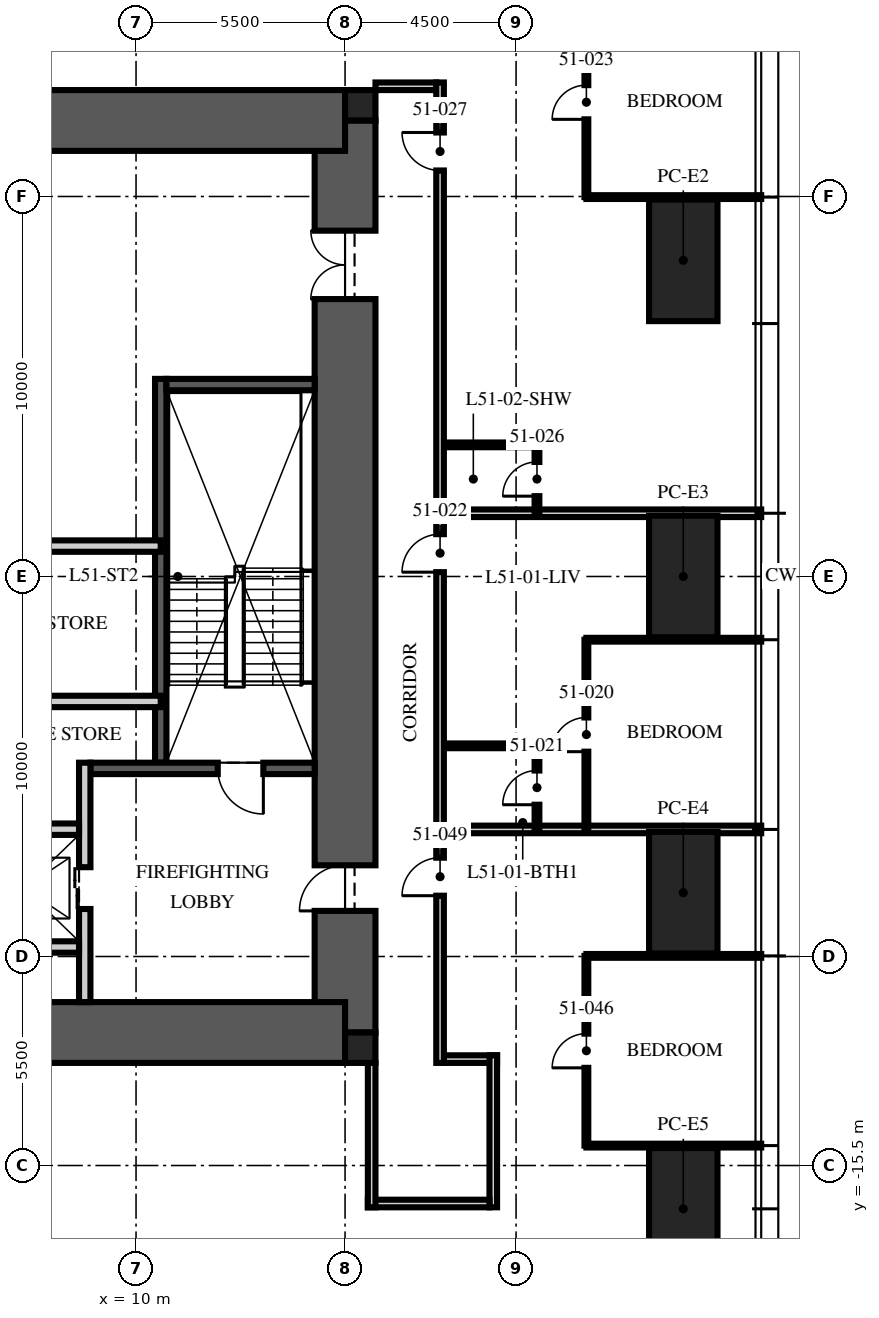
"""IFC4 building model, lengths in metres.
Left out: names, types, materials, properties, quantities, classifications, styles, units other than length and angle.
Written with IfcOpenShell. Run it as: python <this file> out.ifc"""

import sys

from ifc_helpers import new_model, si_unit, direction, frame, frame_2d, origin, origin_2d, place, context, subcontext, project, spatial, rectangle, hollow_rectangle, extrude, element, fill, save


model = new_model("IFC4")
c1 = context("Model", 3, precision=1e-05, world=origin(), true_north=direction((0.0, 1.0)))
c2 = subcontext(c1, "Body", "Model", "MODEL_VIEW")
j1 = project(units=[si_unit("LENGTHUNIT", "METRE"), si_unit("PLANEANGLEUNIT", "RADIAN")], contexts=[c1])
p1 = place(None, origin())
s1 = spatial("IfcSite", under=j1, at=p1, CompositionType="ELEMENT")
p2 = place(p1, origin())
s2 = spatial("IfcBuilding", under=s1, at=p2, CompositionType="ELEMENT")
p3 = place(p2, frame((0.0, 0.0, 207.0)))
s3 = spatial("IfcBuildingStorey", under=s2, at=p3, CompositionType="ELEMENT", Elevation=207.0)
p4 = place(p3, frame((15.5, -12.0, -0.25), z_axis=(0.0, 0.0, 1.0), x_axis=(0.0, 1.0, 0.0)))
e1 = element("IfcWall", 1, at=p4, inside=s3, PredefinedType="SHEAR", context=c2, shape_type="SweptSolid", body=[
    extrude(rectangle(XDim=24.0, YDim=1.6, at=frame_2d((12.0, 0.0))), origin(), (0.0, 0.0, 1.0), 3.75),
])
p5 = place(p4, frame((3.2, 0.0, 0.25)))
e2 = element("IfcOpeningElement", 2, at=p5, cuts=e1, PredefinedType="OPENING", context=c2, shape_type="SweptSolid", body=[
    extrude(rectangle(XDim=1.2, YDim=2.1, at=frame_2d((0.6, 1.05))), frame((0.0, 0.81, 0.0), z_axis=(0.0, -1.0, 0.0), x_axis=(1.0, 0.0, 0.0)), (0.0, 0.0, 1.0), 1.62),
])
p6 = place(p4, frame((19.3, 0.0, 0.25)))
e3 = element("IfcOpeningElement", 3, at=p6, cuts=e1, PredefinedType="OPENING", context=c2, shape_type="SweptSolid", body=[
    extrude(rectangle(XDim=1.8, YDim=2.1, at=frame_2d((0.9, 1.05))), frame((0.0, 0.81, 0.0), z_axis=(0.0, -1.0, 0.0), x_axis=(1.0, 0.0, 0.0)), (0.0, 0.0, 1.0), 1.62),
])
for number, where, z_axis, x_axis in (
    (4, (-15.5, 12.0, -0.25), (0.0, 0.0, 1.0), (1.0, 0.0, 0.0)),
    (5, (-15.5, -12.0, -0.25), (0.0, 0.0, 1.0), (1.0, 0.0, 0.0)),
):
    element("IfcWall", number, at=place(p3, frame(where, z_axis=z_axis, x_axis=x_axis)), inside=s3, PredefinedType="SHEAR", context=c2, shape_type="SweptSolid", body=[
        extrude(rectangle(XDim=31.0, YDim=1.6, at=frame_2d((15.5, 0.0))), origin(), (0.0, 0.0, 1.0), 3.75),
    ])
for number, where, z_axis, x_axis in (
    (6, (15.9, 12.4, -0.25), (0.0, 0.0, 1.0), (1.0, 0.0, 0.0)),
    (7, (15.9, -12.4, -0.25), (0.0, 0.0, 1.0), (1.0, 0.0, 0.0)),
):
    element("IfcColumn", number, at=place(p3, frame(where, z_axis=z_axis, x_axis=x_axis)), inside=s3, PredefinedType="COLUMN", context=c2, shape_type="SweptSolid", body=[
        extrude(rectangle(XDim=0.8, YDim=0.8, at=origin_2d()), origin(), (0.0, 0.0, 1.0), 3.75),
    ])
for number, where, z_axis, x_axis in (
    (8, (24.4, 8.32, 0.0), (0.0, 0.0, 1.0), (0.0, 1.0, 0.0)),
    (9, (24.4, 0.0, 0.0), (0.0, 0.0, 1.0), (0.0, 1.0, 0.0)),
    (10, (24.4, -8.32, 0.0), (0.0, 0.0, 1.0), (0.0, 1.0, 0.0)),
    (11, (24.4, -16.64, 0.0), (0.0, 0.0, 1.0), (0.0, 1.0, 0.0)),
):
    element("IfcColumn", number, at=place(p3, frame(where, z_axis=z_axis, x_axis=x_axis)), inside=s3, PredefinedType="COLUMN", context=c2, shape_type="SweptSolid", body=[
        extrude(hollow_rectangle(XDim=3.2, YDim=1.8, WallThickness=0.2, at=origin_2d()), origin(), (0.0, 0.0, 1.0), 3.75),
    ])
p7 = place(p3, frame((10.65, -4.9, 0.0), z_axis=(0.0, 0.0, 1.0), x_axis=(0.0, 1.0, 0.0)))
e12 = element("IfcWall", 12, at=p7, inside=s3, PredefinedType="SOLIDWALL", context=c2, shape_type="SweptSolid", body=[
    extrude(rectangle(XDim=10.1, YDim=0.3, at=frame_2d((5.05, 0.0))), origin(), (0.0, 0.0, 1.0), 3.5),
])
p8 = place(p3, frame((14.7, -5.05, 0.0), z_axis=(0.0, 0.0, 1.0), x_axis=(-1.0, 0.0, 0.0)))
e13 = element("IfcWall", 13, at=p8, inside=s3, PredefinedType="SOLIDWALL", context=c2, shape_type="SweptSolid", body=[
    extrude(rectangle(XDim=5.9, YDim=0.3, at=frame_2d((2.95, 0.0))), origin(), (0.0, 0.0, 1.0), 3.5),
])
p9 = place(p8, frame((1.35, 0.0, 0.0)))
e14 = element("IfcOpeningElement", 14, at=p9, cuts=e13, PredefinedType="OPENING", context=c2, shape_type="SweptSolid", body=[
    extrude(rectangle(XDim=1.2, YDim=2.1, at=frame_2d((0.6, 1.05))), frame((0.0, 0.16, 0.0), z_axis=(0.0, -1.0, 0.0), x_axis=(1.0, 0.0, 0.0)), (0.0, 0.0, 1.0), 0.32),
])
p10 = place(p3, frame((14.7, 5.05, 0.0), z_axis=(0.0, 0.0, 1.0), x_axis=(-1.0, 0.0, 0.0)))
e15 = element("IfcWall", 15, at=p10, inside=s3, PredefinedType="SOLIDWALL", context=c2, shape_type="SweptSolid", body=[
    extrude(rectangle(XDim=3.9, YDim=0.3, at=frame_2d((1.95, 0.0))), origin(), (0.0, 0.0, 1.0), 3.5),
])
p11 = place(p3, frame((8.65, -11.2, 0.0), z_axis=(0.0, 0.0, 1.0), x_axis=(0.0, 1.0, 0.0)))
e16 = element("IfcWall", 16, at=p11, inside=s3, PredefinedType="PARTITIONING", context=c2, shape_type="SweptSolid", body=[
    extrude(rectangle(XDim=6.3, YDim=0.3, at=frame_2d((3.15, 0.0))), origin(), (0.0, 0.0, 1.0), 3.5),
])
p12 = place(p11, frame((2.45, 0.0, 0.0)))
e17 = element("IfcOpeningElement", 17, at=p12, cuts=e16, PredefinedType="OPENING", context=c2, shape_type="SweptSolid", body=[
    extrude(rectangle(XDim=1.1, YDim=2.1, at=frame_2d((0.55, 1.05))), frame((0.0, 0.16, 0.0), z_axis=(0.0, -1.0, 0.0), x_axis=(1.0, 0.0, 0.0)), (0.0, 0.0, 1.0), 0.32),
])
p13 = place(p3, frame((-8.5, -6.65, 0.0), z_axis=(0.0, 0.0, 1.0), x_axis=(1.0, 0.0, 0.0)))
e18 = element("IfcWall", 18, at=p13, inside=s3, PredefinedType="PARTITIONING", context=c2, shape_type="SweptSolid", body=[
    extrude(rectangle(XDim=17.0, YDim=0.3, at=frame_2d((8.5, 0.0))), origin(), (0.0, 0.0, 1.0), 3.5),
])
p14 = place(p13, frame((7.8, 0.0, 0.0)))
e19 = element("IfcOpeningElement", 19, at=p14, cuts=e18, PredefinedType="OPENING", context=c2, shape_type="SweptSolid", body=[
    extrude(rectangle(XDim=1.3, YDim=2.4, at=frame_2d((0.65, 1.2))), frame((0.0, 0.16, 0.0), z_axis=(0.0, -1.0, 0.0), x_axis=(1.0, 0.0, 0.0)), (0.0, 0.0, 1.0), 0.32),
])
p15 = place(p13, frame((5.65, 0.0, 0.0)))
e20 = element("IfcOpeningElement", 20, at=p15, cuts=e18, PredefinedType="OPENING", context=c2, shape_type="SweptSolid", body=[
    extrude(rectangle(XDim=0.9, YDim=2.1, at=frame_2d((0.45, 1.05))), frame((0.0, 0.16, 0.0), z_axis=(0.0, -1.0, 0.0), x_axis=(1.0, 0.0, 0.0)), (0.0, 0.0, 1.0), 0.32),
])
p16 = place(p13, frame((10.4, 0.0, 0.0)))
e21 = element("IfcOpeningElement", 21, at=p16, cuts=e18, PredefinedType="OPENING", context=c2, shape_type="SweptSolid", body=[
    extrude(rectangle(XDim=0.9, YDim=2.1, at=frame_2d((0.45, 1.05))), frame((0.0, 0.16, 0.0), z_axis=(0.0, -1.0, 0.0), x_axis=(1.0, 0.0, 0.0)), (0.0, 0.0, 1.0), 0.32),
])
p17 = place(p3, frame((5.6, -9.75, 0.0), z_axis=(0.0, 0.0, 1.0), x_axis=(1.0, 0.0, 0.0)))
e22 = element("IfcWall", 22, at=p17, inside=s3, PredefinedType="PARTITIONING", context=c2, shape_type="SweptSolid", body=[
    extrude(rectangle(XDim=2.9, YDim=0.3, at=frame_2d((1.45, 0.0))), origin(), (0.0, 0.0, 1.0), 3.5),
])
p18 = place(p3, frame((-10.65, 0.8, 0.0), z_axis=(0.0, 0.0, 1.0), x_axis=(1.0, 0.0, 0.0)))
e23 = element("IfcWall", 23, at=p18, inside=s3, PredefinedType="PARTITIONING", context=c2, shape_type="SweptSolid", body=[
    extrude(rectangle(XDim=21.3, YDim=0.3, at=frame_2d((10.65, 0.0))), origin(), (0.0, 0.0, 1.0), 3.5),
])
p19 = place(p18, frame((10.05, 0.0, 0.0)))
e24 = element("IfcOpeningElement", 24, at=p19, cuts=e23, PredefinedType="OPENING", context=c2, shape_type="SweptSolid", body=[
    extrude(rectangle(XDim=1.2, YDim=2.1, at=frame_2d((0.6, 1.05))), frame((0.0, 0.16, 0.0), z_axis=(0.0, -1.0, 0.0), x_axis=(1.0, 0.0, 0.0)), (0.0, 0.0, 1.0), 0.32),
])
p20 = place(p18, frame((1.74, 0.0, 0.0)))
e25 = element("IfcOpeningElement", 25, at=p20, cuts=e23, PredefinedType="OPENING", context=c2, shape_type="SweptSolid", body=[
    extrude(rectangle(XDim=0.9, YDim=2.1, at=frame_2d((0.45, 1.05))), frame((0.0, 0.16, 0.0), z_axis=(0.0, -1.0, 0.0), x_axis=(1.0, 0.0, 0.0)), (0.0, 0.0, 1.0), 0.32),
])
p21 = place(p3, frame((10.65, -3.288, 0.0), z_axis=(0.0, 0.0, 1.0), x_axis=(-1.0, 0.0, 0.0)))
e26 = element("IfcWall", 26, at=p21, inside=s3, PredefinedType="PARTITIONING", context=c2, shape_type="SweptSolid", body=[
    extrude(rectangle(XDim=7.35, YDim=0.3, at=frame_2d((3.675, 0.0))), origin(), (0.0, 0.0, 1.0), 3.5),
])
p22 = place(p3, frame((18.1, -12.7, 0.0), z_axis=(0.0, 0.0, 1.0), x_axis=(1.0, 0.0, 0.0)))
e27 = element("IfcWall", 27, at=p22, inside=s3, PredefinedType="PARTITIONING", context=c2, shape_type="SweptSolid", body=[
    extrude(rectangle(XDim=1.4, YDim=0.2, at=frame_2d((0.7, 0.0))), origin(), (0.0, 0.0, 1.0), 2.81),
])
p23 = place(p3, frame((19.4, -12.6, 0.0), z_axis=(0.0, 0.0, 1.0), x_axis=(0.0, -1.0, 0.0)))
e28 = element("IfcWall", 28, at=p23, inside=s3, PredefinedType="PARTITIONING", context=c2, shape_type="SweptSolid", body=[
    extrude(rectangle(XDim=4.0, YDim=0.2, at=frame_2d((2.0, 0.0))), origin(), (0.0, 0.0, 1.0), 2.6),
])
p24 = place(p3, frame((19.3, -16.5, 0.0), z_axis=(0.0, 0.0, 1.0), x_axis=(-1.0, 0.0, 0.0)))
e29 = element("IfcWall", 29, at=p24, inside=s3, PredefinedType="PARTITIONING", context=c2, shape_type="SweptSolid", body=[
    extrude(rectangle(XDim=3.2, YDim=0.2, at=frame_2d((1.6, 0.0))), origin(), (0.0, 0.0, 1.0), 2.3),
])
p25 = place(p3, frame((16.2, -16.6, 0.0), z_axis=(0.0, 0.0, 1.0), x_axis=(0.0, 1.0, 0.0)))
e30 = element("IfcWall", 30, at=p25, inside=s3, PredefinedType="PARTITIONING", context=c2, shape_type="SweptSolid", body=[
    extrude(rectangle(XDim=3.8, YDim=0.2, at=frame_2d((1.9, 0.0))), origin(), (0.0, 0.0, 1.0), 2.3),
])
p26 = place(p3, frame((16.3, 12.9, 0.0), z_axis=(0.0, 0.0, 1.0), x_axis=(1.0, 0.0, 0.0)))
e31 = element("IfcWall", 31, at=p26, inside=s3, PredefinedType="PARTITIONING", context=c2, shape_type="SweptSolid", body=[
    extrude(rectangle(XDim=1.6, YDim=0.2, at=frame_2d((0.8, 0.0))), origin(), (0.0, 0.0, 1.0), 2.3),
])
p27 = place(p3, frame((18.1, -6.656, 0.0), z_axis=(0.0, 0.0, 1.0), x_axis=(1.0, 0.0, 0.0)))
e32 = element("IfcWall", 32, at=p27, inside=s3, PredefinedType="PARTITIONING", context=c2, shape_type="SweptSolid", body=[
    extrude(rectangle(XDim=8.35, YDim=0.2, at=frame_2d((4.175, 0.0))), origin(), (0.0, 0.0, 1.0), 2.91),
])
p28 = place(p3, frame((21.85, -1.664, 0.0), z_axis=(0.0, 0.0, 1.0), x_axis=(1.0, 0.0, 0.0)))
e33 = element("IfcWall", 33, at=p28, inside=s3, PredefinedType="PARTITIONING", context=c2, shape_type="SweptSolid", body=[
    extrude(rectangle(XDim=4.6, YDim=0.1, at=frame_2d((2.3, 0.0))), origin(), (0.0, 0.0, 1.0), 2.91),
])
p29 = place(p3, frame((18.1, 1.664, 0.0), z_axis=(0.0, 0.0, 1.0), x_axis=(1.0, 0.0, 0.0)))
e34 = element("IfcWall", 34, at=p29, inside=s3, PredefinedType="PARTITIONING", context=c2, shape_type="SweptSolid", body=[
    extrude(rectangle(XDim=8.35, YDim=0.2, at=frame_2d((4.175, 0.0))), origin(), (0.0, 0.0, 1.0), 2.91),
])
for number, where, z_axis, x_axis in (
    (35, (21.85, 9.984, 0.0), (0.0, 0.0, 1.0), (1.0, 0.0, 0.0)),
    (36, (21.85, -14.976, 0.0), (0.0, 0.0, 1.0), (1.0, 0.0, 0.0)),
    (37, (21.85, -9.984, 0.0), (0.0, 0.0, 1.0), (1.0, 0.0, 0.0)),
):
    element("IfcWall", number, at=place(p3, frame(where, z_axis=z_axis, x_axis=x_axis)), inside=s3, PredefinedType="PARTITIONING", context=c2, shape_type="SweptSolid", body=[
        extrude(rectangle(XDim=4.6, YDim=0.1, at=frame_2d((2.3, 0.0))), origin(), (0.0, 0.0, 1.0), 2.91),
    ])
p30 = place(p3, frame((21.85, -6.656, 0.0), z_axis=(0.0, 0.0, 1.0), x_axis=(0.0, 1.0, 0.0)))
e38 = element("IfcWall", 38, at=p30, inside=s3, PredefinedType="PARTITIONING", context=c2, shape_type="SweptSolid", body=[
    extrude(rectangle(XDim=4.992, YDim=0.1, at=frame_2d((2.496, 0.0))), origin(), (0.0, 0.0, 1.0), 2.81),
])
p31 = place(p30, frame((2.046, 0.0, 0.0)))
e39 = element("IfcOpeningElement", 39, at=p31, cuts=e38, PredefinedType="OPENING", context=c2, shape_type="SweptSolid", body=[
    extrude(rectangle(XDim=0.9, YDim=2.1, at=frame_2d((0.45, 1.05))), frame((0.0, 0.06, 0.0), z_axis=(0.0, -1.0, 0.0), x_axis=(1.0, 0.0, 0.0)), (0.0, 0.0, 1.0), 0.12),
])
p32 = place(p3, frame((20.55, -6.656, 0.0), z_axis=(0.0, 0.0, 1.0), x_axis=(0.0, 1.0, 0.0)))
e40 = element("IfcWall", 40, at=p32, inside=s3, PredefinedType="PARTITIONING", context=c2, shape_type="SweptSolid", body=[
    extrude(rectangle(XDim=2.2, YDim=0.125, at=frame_2d((1.1, 0.0))), origin(), (0.0, 0.0, 1.0), 3.5),
])
p33 = place(p32, frame((0.65, 0.0, 0.0)))
e41 = element("IfcOpeningElement", 41, at=p33, cuts=e40, PredefinedType="OPENING", context=c2, shape_type="SweptSolid", body=[
    extrude(rectangle(XDim=0.9, YDim=2.1, at=frame_2d((0.45, 1.05))), frame((0.0, 0.073, 0.0), z_axis=(0.0, -1.0, 0.0), x_axis=(1.0, 0.0, 0.0)), (0.0, 0.0, 1.0), 0.145),
])
p34 = place(p3, frame((18.1, -4.456, 0.0), z_axis=(0.0, 0.0, 1.0), x_axis=(1.0, 0.0, 0.0)))
e42 = element("IfcWall", 42, at=p34, inside=s3, PredefinedType="PARTITIONING", context=c2, shape_type="SweptSolid", body=[
    extrude(rectangle(XDim=2.45, YDim=0.125, at=frame_2d((1.225, 0.0))), origin(), (0.0, 0.0, 1.0), 3.5),
])
p35 = place(p3, frame((21.85, 9.984, 0.0), z_axis=(0.0, 0.0, 1.0), x_axis=(0.0, 1.0, 0.0)))
e43 = element("IfcWall", 43, at=p35, inside=s3, PredefinedType="PARTITIONING", context=c2, shape_type="SweptSolid", body=[
    extrude(rectangle(XDim=4.992, YDim=0.1, at=frame_2d((2.496, 0.0))), origin(), (0.0, 0.0, 1.0), 2.81),
])
p36 = place(p35, frame((2.046, 0.0, 0.0)))
e44 = element("IfcOpeningElement", 44, at=p36, cuts=e43, PredefinedType="OPENING", context=c2, shape_type="SweptSolid", body=[
    extrude(rectangle(XDim=0.9, YDim=2.1, at=frame_2d((0.45, 1.05))), frame((0.0, 0.06, 0.0), z_axis=(0.0, -1.0, 0.0), x_axis=(1.0, 0.0, 0.0)), (0.0, 0.0, 1.0), 0.12),
])
p37 = place(p3, frame((20.55, 1.664, 0.0), z_axis=(0.0, 0.0, 1.0), x_axis=(0.0, 1.0, 0.0)))
e45 = element("IfcWall", 45, at=p37, inside=s3, PredefinedType="PARTITIONING", context=c2, shape_type="SweptSolid", body=[
    extrude(rectangle(XDim=1.8, YDim=0.125, at=frame_2d((0.9, 0.0))), origin(), (0.0, 0.0, 1.0), 3.5),
])
p38 = place(p37, frame((0.45, 0.0, 0.0)))
e46 = element("IfcOpeningElement", 46, at=p38, cuts=e45, PredefinedType="OPENING", context=c2, shape_type="SweptSolid", body=[
    extrude(rectangle(XDim=0.9, YDim=2.1, at=frame_2d((0.45, 1.05))), frame((0.0, 0.073, 0.0), z_axis=(0.0, -1.0, 0.0), x_axis=(1.0, 0.0, 0.0)), (0.0, 0.0, 1.0), 0.145),
])
p39 = place(p3, frame((18.1, 3.464, 0.0), z_axis=(0.0, 0.0, 1.0), x_axis=(1.0, 0.0, 0.0)))
e47 = element("IfcWall", 47, at=p39, inside=s3, PredefinedType="PARTITIONING", context=c2, shape_type="SweptSolid", body=[
    extrude(rectangle(XDim=2.45, YDim=0.125, at=frame_2d((1.225, 0.0))), origin(), (0.0, 0.0, 1.0), 3.5),
])
p40 = place(p3, frame((21.85, -14.976, 0.0), z_axis=(0.0, 0.0, 1.0), x_axis=(0.0, 1.0, 0.0)))
e48 = element("IfcWall", 48, at=p40, inside=s3, PredefinedType="PARTITIONING", context=c2, shape_type="SweptSolid", body=[
    extrude(rectangle(XDim=4.992, YDim=0.1, at=frame_2d((2.496, 0.0))), origin(), (0.0, 0.0, 1.0), 2.81),
])
p41 = place(p40, frame((2.046, 0.0, 0.0)))
e49 = element("IfcOpeningElement", 49, at=p41, cuts=e48, PredefinedType="OPENING", context=c2, shape_type="SweptSolid", body=[
    extrude(rectangle(XDim=0.9, YDim=2.1, at=frame_2d((0.45, 1.05))), frame((0.0, 0.06, 0.0), z_axis=(0.0, -1.0, 0.0), x_axis=(1.0, 0.0, 0.0)), (0.0, 0.0, 1.0), 0.12),
])
p42 = place(p3, frame((18.0, -12.8, 0.0), z_axis=(0.0, 0.0, 1.0), x_axis=(0.0, 1.0, 0.0)))
e50 = element("IfcWall", 50, at=p42, inside=s3, PredefinedType="PARTITIONING", context=c2, shape_type="SweptSolid", body=[
    extrude(rectangle(XDim=25.8, YDim=0.2, at=frame_2d((12.9, 0.0))), origin(), (0.0, 0.0, 1.0), 2.6),
])
p43 = place(p42, frame((12.914, 0.0, 0.0)))
e51 = element("IfcOpeningElement", 51, at=p43, cuts=e50, PredefinedType="OPENING", context=c2, shape_type="SweptSolid", body=[
    extrude(rectangle(XDim=1.0, YDim=2.2, at=frame_2d((0.5, 1.1))), frame((0.0, 0.11, 0.0), z_axis=(0.0, -1.0, 0.0), x_axis=(1.0, 0.0, 0.0)), (0.0, 0.0, 1.0), 0.22),
])
p44 = place(p42, frame((23.484, 0.0, 0.0)))
e52 = element("IfcOpeningElement", 52, at=p44, cuts=e50, PredefinedType="OPENING", context=c2, shape_type="SweptSolid", body=[
    extrude(rectangle(XDim=1.0, YDim=2.2, at=frame_2d((0.5, 1.1))), frame((0.0, 0.11, 0.0), z_axis=(0.0, -1.0, 0.0), x_axis=(1.0, 0.0, 0.0)), (0.0, 0.0, 1.0), 0.22),
])
p45 = place(p42, frame((4.4, 0.0, 0.0)))
e53 = element("IfcOpeningElement", 53, at=p45, cuts=e50, PredefinedType="OPENING", context=c2, shape_type="SweptSolid", body=[
    extrude(rectangle(XDim=1.0, YDim=2.2, at=frame_2d((0.5, 1.1))), frame((0.0, 0.11, 0.0), z_axis=(0.0, -1.0, 0.0), x_axis=(1.0, 0.0, 0.0)), (0.0, 0.0, 1.0), 0.22),
])
p46 = place(p9, origin())
e54 = element("IfcDoor", 54, at=p46, inside=s3, OperationType="SINGLE_SWING_LEFT", PredefinedType="DOOR", context=c2, shape_type="SweptSolid", body=[
    extrude(rectangle(XDim=1.2, YDim=2.1, at=frame_2d((0.6, 1.05))), frame((0.0, 0.025, 0.0), z_axis=(0.0, -1.0, 0.0), x_axis=(1.0, 0.0, 0.0)), (0.0, 0.0, 1.0), 0.05),
])
fill(e14, e54)
p47 = place(p5, origin())
e55 = element("IfcDoor", 55, at=p47, inside=s3, OperationType="SINGLE_SWING_LEFT", PredefinedType="DOOR", context=c2, shape_type="SweptSolid", body=[
    extrude(rectangle(XDim=1.2, YDim=2.1, at=frame_2d((0.6, 1.05))), frame((0.0, 0.025, 0.0), z_axis=(0.0, -1.0, 0.0), x_axis=(1.0, 0.0, 0.0)), (0.0, 0.0, 1.0), 0.05),
])
fill(e2, e55)
p48 = place(p6, origin())
e56 = element("IfcDoor", 56, at=p48, inside=s3, OperationType="DOUBLE_DOOR_SINGLE_SWING", PredefinedType="DOOR", context=c2, shape_type="SweptSolid", body=[
    extrude(rectangle(XDim=1.8, YDim=2.1, at=frame_2d((0.9, 1.05))), frame((0.0, 0.025, 0.0), z_axis=(0.0, -1.0, 0.0), x_axis=(1.0, 0.0, 0.0)), (0.0, 0.0, 1.0), 0.05),
])
fill(e3, e56)
p49 = place(p12, origin())
e57 = element("IfcDoor", 57, at=p49, inside=s3, OperationType="DOUBLE_DOOR_SLIDING", PredefinedType="DOOR", context=c2, shape_type="SweptSolid", body=[
    extrude(rectangle(XDim=1.1, YDim=2.1, at=frame_2d((0.55, 1.05))), frame((0.0, 0.025, 0.0), z_axis=(0.0, -1.0, 0.0), x_axis=(1.0, 0.0, 0.0)), (0.0, 0.0, 1.0), 0.05),
])
fill(e17, e57)
p50 = place(p31, origin())
e58 = element("IfcDoor", 58, at=p50, inside=s3, OperationType="SINGLE_SWING_LEFT", PredefinedType="DOOR", context=c2, shape_type="SweptSolid", body=[
    extrude(rectangle(XDim=0.9, YDim=2.1, at=frame_2d((0.45, 1.05))), frame((0.0, 0.025, 0.0), z_axis=(0.0, -1.0, 0.0), x_axis=(1.0, 0.0, 0.0)), (0.0, 0.0, 1.0), 0.05),
])
fill(e39, e58)
p51 = place(p33, origin())
e59 = element("IfcDoor", 59, at=p51, inside=s3, OperationType="SINGLE_SWING_LEFT", PredefinedType="DOOR", context=c2, shape_type="SweptSolid", body=[
    extrude(rectangle(XDim=0.9, YDim=2.1, at=frame_2d((0.45, 1.05))), frame((0.0, 0.025, 0.0), z_axis=(0.0, -1.0, 0.0), x_axis=(1.0, 0.0, 0.0)), (0.0, 0.0, 1.0), 0.05),
])
fill(e41, e59)
p52 = place(p43, origin())
e60 = element("IfcDoor", 60, at=p52, inside=s3, OperationType="SINGLE_SWING_LEFT", PredefinedType="DOOR", context=c2, shape_type="SweptSolid", body=[
    extrude(rectangle(XDim=1.0, YDim=2.2, at=frame_2d((0.5, 1.1))), frame((0.0, 0.025, 0.0), z_axis=(0.0, -1.0, 0.0), x_axis=(1.0, 0.0, 0.0)), (0.0, 0.0, 1.0), 0.05),
])
fill(e51, e60)
p53 = place(p36, origin())
e61 = element("IfcDoor", 61, at=p53, inside=s3, OperationType="SINGLE_SWING_LEFT", PredefinedType="DOOR", context=c2, shape_type="SweptSolid", body=[
    extrude(rectangle(XDim=0.9, YDim=2.1, at=frame_2d((0.45, 1.05))), frame((0.0, 0.025, 0.0), z_axis=(0.0, -1.0, 0.0), x_axis=(1.0, 0.0, 0.0)), (0.0, 0.0, 1.0), 0.05),
])
fill(e44, e61)
p54 = place(p38, origin())
e62 = element("IfcDoor", 62, at=p54, inside=s3, OperationType="SINGLE_SWING_LEFT", PredefinedType="DOOR", context=c2, shape_type="SweptSolid", body=[
    extrude(rectangle(XDim=0.9, YDim=2.1, at=frame_2d((0.45, 1.05))), frame((0.0, 0.025, 0.0), z_axis=(0.0, -1.0, 0.0), x_axis=(1.0, 0.0, 0.0)), (0.0, 0.0, 1.0), 0.05),
])
fill(e46, e62)
p55 = place(p44, origin())
e63 = element("IfcDoor", 63, at=p55, inside=s3, OperationType="SINGLE_SWING_RIGHT", PredefinedType="DOOR", context=c2, shape_type="SweptSolid", body=[
    extrude(rectangle(XDim=1.0, YDim=2.2, at=frame_2d((0.5, 1.1))), frame((0.0, 0.025, 0.0), z_axis=(0.0, -1.0, 0.0), x_axis=(1.0, 0.0, 0.0)), (0.0, 0.0, 1.0), 0.05),
])
fill(e52, e63)
p56 = place(p41, origin())
e64 = element("IfcDoor", 64, at=p56, inside=s3, OperationType="SINGLE_SWING_LEFT", PredefinedType="DOOR", context=c2, shape_type="SweptSolid", body=[
    extrude(rectangle(XDim=0.9, YDim=2.1, at=frame_2d((0.45, 1.05))), frame((0.0, 0.025, 0.0), z_axis=(0.0, -1.0, 0.0), x_axis=(1.0, 0.0, 0.0)), (0.0, 0.0, 1.0), 0.05),
])
fill(e49, e64)
p57 = place(p45, origin())
e65 = element("IfcDoor", 65, at=p57, inside=s3, OperationType="SINGLE_SWING_LEFT", PredefinedType="DOOR", context=c2, shape_type="SweptSolid", body=[
    extrude(rectangle(XDim=1.0, YDim=2.2, at=frame_2d((0.5, 1.1))), frame((0.0, 0.025, 0.0), z_axis=(0.0, -1.0, 0.0), x_axis=(1.0, 0.0, 0.0)), (0.0, 0.0, 1.0), 0.05),
])
fill(e53, e65)
save(model, sys.argv[1])
